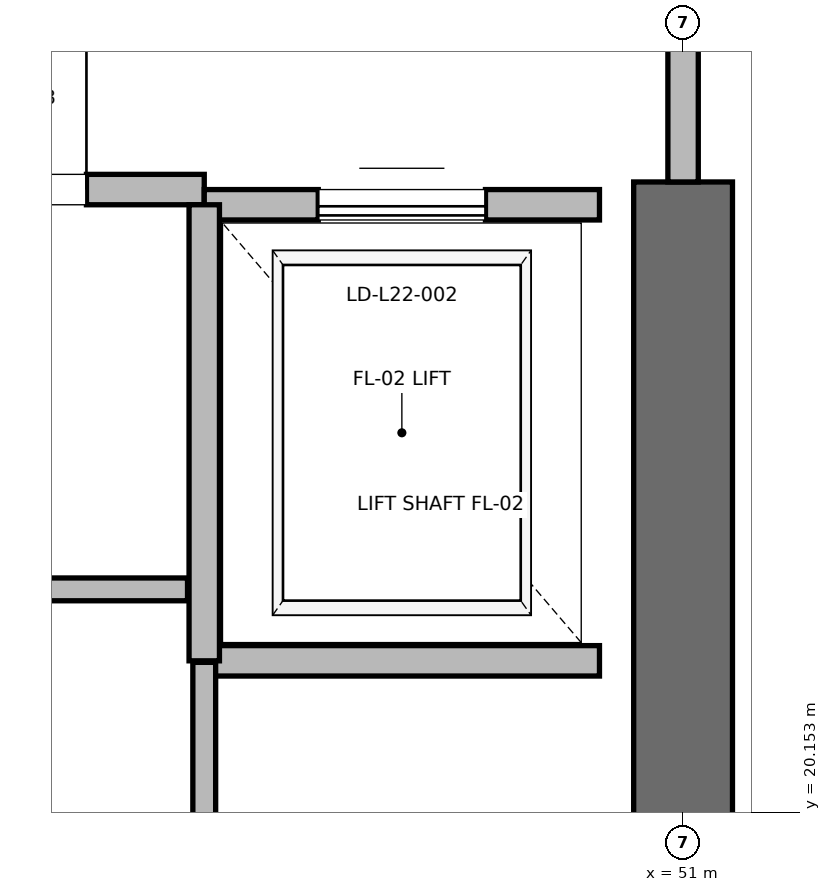
"""IFC4 building model, lengths in metres.
Left out: names, types, materials, properties, quantities, classifications, styles, units other than length and angle.
Written with IfcOpenShell. Run it as: python <this file> out.ifc"""

import sys

from ifc_helpers import new_model, si_unit, direction, frame, frame_2d, origin, place, context, subcontext, project, spatial, rectangle, extrude, element, fill, save


model = new_model("IFC4")
c1 = context("Model", 3, precision=1e-05, world=origin(), true_north=direction((0.0, 1.0)))
c2 = subcontext(c1, "Body", "Model", "MODEL_VIEW")
j1 = project(units=[si_unit("LENGTHUNIT", "METRE"), si_unit("PLANEANGLEUNIT", "RADIAN")], contexts=[c1])
p1 = place(None, origin())
s1 = spatial("IfcSite", under=j1, at=p1, CompositionType="ELEMENT")
p2 = place(p1, origin())
s2 = spatial("IfcBuilding", under=s1, at=p2, CompositionType="ELEMENT")
p3 = place(p2, frame((0.0, 0.0, 95.6)))
s3 = spatial("IfcBuildingStorey", under=s2, at=p3, CompositionType="ELEMENT", Elevation=95.6)
p4 = place(p3, frame((51.0, 18.5, 0.0), z_axis=(0.0, 0.0, 1.0), x_axis=(0.0, 1.0, 0.0)))
e1 = element("IfcWall", 1, at=p4, inside=s3, PredefinedType="SHEAR", context=c2, shape_type="SweptSolid", body=[
    extrude(rectangle(XDim=5.8, YDim=0.65, at=frame_2d((2.9, 0.0))), origin(), (0.0, 0.0, 1.0), 3.76),
])
p5 = place(p3, frame((45.15, 24.25, 0.0), z_axis=(0.0, 0.0, 1.0), x_axis=(1.0, 0.0, 0.0)))
e2 = element("IfcWall", 2, at=p5, inside=s3, PredefinedType="PARTITIONING", context=c2, shape_type="SweptSolid", body=[
    extrude(rectangle(XDim=2.7, YDim=0.2, at=frame_2d((1.35, 0.0))), origin(), (0.0, 0.0, 1.0), 3.76),
])
p6 = place(p5, frame((0.775, 0.0, 0.0)))
e3 = element("IfcOpeningElement", 3, at=p6, cuts=e2, PredefinedType="OPENING", context=c2, shape_type="SweptSolid", body=[
    extrude(rectangle(XDim=1.15, YDim=2.2, at=frame_2d((0.575, 1.1))), frame((0.0, 0.1, 0.0), z_axis=(0.0, -1.0, 0.0), x_axis=(1.0, 0.0, 0.0)), (0.0, 0.0, 1.0), 0.2),
])
p7 = place(p3, frame((51.0, 24.3, 0.0), z_axis=(0.0, 0.0, 1.0), x_axis=(0.0, 1.0, 0.0)))
e4 = element("IfcWall", 4, at=p7, inside=s3, PredefinedType="PARTITIONING", context=c2, shape_type="SweptSolid", body=[
    extrude(rectangle(XDim=3.4, YDim=0.2, at=frame_2d((1.7, 0.0))), origin(), (0.0, 0.0, 1.0), 2.54),
])
p8 = place(p7, frame((1.125, 0.0, 0.0)))
e5 = element("IfcOpeningElement", 5, at=p8, cuts=e4, PredefinedType="OPENING", context=c2, shape_type="SweptSolid", body=[
    extrude(rectangle(XDim=1.15, YDim=2.2, at=frame_2d((0.575, 1.1))), frame((0.0, 0.1, 0.0), z_axis=(0.0, -1.0, 0.0), x_axis=(1.0, 0.0, 0.0)), (0.0, 0.0, 1.0), 0.2),
])
p9 = place(p3, frame((47.85, 21.15, 0.0), z_axis=(0.0, 0.0, 1.0), x_axis=(1.0, 0.0, 0.0)))
e6 = element("IfcWall", 6, at=p9, inside=s3, PredefinedType="SOLIDWALL", context=c2, shape_type="SweptSolid", body=[
    extrude(rectangle(XDim=2.6, YDim=0.2, at=frame_2d((1.3, 0.0))), origin(), (0.0, 0.0, 1.0), 3.76),
])
p10 = place(p3, frame((50.45, 24.15, 0.0), z_axis=(0.0, 0.0, 1.0), x_axis=(-1.0, 0.0, 0.0)))
e7 = element("IfcWall", 7, at=p10, inside=s3, PredefinedType="SOLIDWALL", context=c2, shape_type="SweptSolid", body=[
    extrude(rectangle(XDim=2.6, YDim=0.2, at=frame_2d((1.3, 0.0))), origin(), (0.0, 0.0, 1.0), 2.54),
])
p11 = place(p10, frame((0.75, 0.0, 0.0)))
e8 = element("IfcOpeningElement", 8, at=p11, cuts=e7, PredefinedType="OPENING", context=c2, shape_type="SweptSolid", body=[
    extrude(rectangle(XDim=1.1, YDim=2.2, at=frame_2d((0.55, 1.1))), frame((0.0, 0.1, 0.0), z_axis=(0.0, -1.0, 0.0), x_axis=(1.0, 0.0, 0.0)), (0.0, 0.0, 1.0), 0.2),
])
p12 = place(p3, frame((47.85, 24.15, 0.0), z_axis=(0.0, 0.0, 1.0), x_axis=(0.0, -1.0, 0.0)))
e9 = element("IfcWall", 9, at=p12, inside=s3, PredefinedType="SOLIDWALL", context=c2, shape_type="SweptSolid", body=[
    extrude(rectangle(XDim=3.0, YDim=0.2, at=frame_2d((1.5, 0.0))), origin(), (0.0, 0.0, 1.0), 3.76),
])
p13 = place(p3, frame((47.85, 18.6, 0.0), z_axis=(0.0, 0.0, 1.0), x_axis=(0.0, 1.0, 0.0)))
e10 = element("IfcWall", 10, at=p13, inside=s3, PredefinedType="PARTITIONING", context=c2, shape_type="SweptSolid", body=[
    extrude(rectangle(XDim=2.54, YDim=0.15, at=frame_2d((1.27, 0.0))), origin(), (0.0, 0.0, 1.0), 2.85),
])
p14 = place(p3, frame((44.8, 21.62, 0.0), z_axis=(0.0, 0.0, 1.0), x_axis=(1.0, 0.0, 0.0)))
e11 = element("IfcWall", 11, at=p14, inside=s3, PredefinedType="PARTITIONING", context=c2, shape_type="SweptSolid", body=[
    extrude(rectangle(XDim=2.94, YDim=0.15, at=frame_2d((1.47, 0.0))), origin(), (0.0, 0.0, 1.0), 2.85),
])
p15 = place(p14, frame((0.97, 0.0, 0.0)))
e12 = element("IfcOpeningElement", 12, at=p15, cuts=e11, PredefinedType="OPENING", context=c2, shape_type="SweptSolid", body=[
    extrude(rectangle(XDim=1.0, YDim=2.15, at=frame_2d((0.5, 1.075))), frame((0.0, 0.075, 0.0), z_axis=(0.0, -1.0, 0.0), x_axis=(1.0, 0.0, 0.0)), (0.0, 0.0, 1.0), 0.15),
])
p16 = place(p6, origin())
e13 = element("IfcDoor", 13, at=p16, inside=s3, OperationType="SINGLE_SWING_RIGHT", PredefinedType="DOOR", context=c2, shape_type="SweptSolid", body=[
    extrude(rectangle(XDim=1.15, YDim=2.2, at=frame_2d((0.575, 1.1))), frame((0.0, 0.025, 0.0), z_axis=(0.0, -1.0, 0.0), x_axis=(1.0, 0.0, 0.0)), (0.0, 0.0, 1.0), 0.05),
])
fill(e3, e13)
p17 = place(p11, origin())
e14 = element("IfcDoor", 14, at=p17, inside=s3, OperationType="SLIDING_TO_RIGHT", PredefinedType="DOOR", context=c2, shape_type="SweptSolid", body=[
    extrude(rectangle(XDim=1.1, YDim=2.2, at=frame_2d((0.55, 1.1))), frame((0.0, 0.025, 0.0), z_axis=(0.0, -1.0, 0.0), x_axis=(1.0, 0.0, 0.0)), (0.0, 0.0, 1.0), 0.05),
])
fill(e8, e14)
save(model, sys.argv[1])
